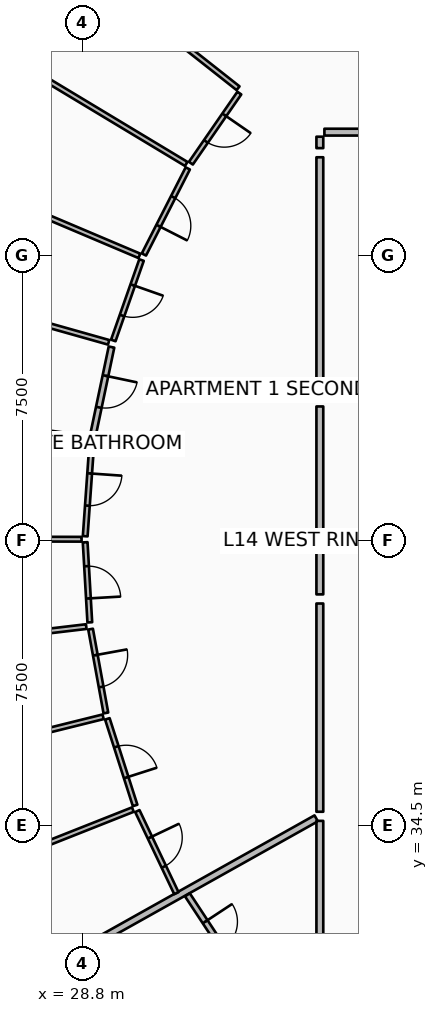
"""IFC4 building model, lengths in metres.
Left out: names, types, materials, properties, quantities, classifications, styles, units other than length and angle.
Written with IfcOpenShell. Run it as: python <this file> out.ifc"""

import sys

from ifc_helpers import new_model, si_unit, direction, frame, frame_2d, origin, place, context, subcontext, project, spatial, rectangle, extrude, element, fill, save


model = new_model("IFC4")
c1 = context("Model", 3, precision=1e-05, world=origin(), true_north=direction((0.0, 1.0)))
c2 = subcontext(c1, "Body", "Model", "MODEL_VIEW")
j1 = project(units=[si_unit("LENGTHUNIT", "METRE"), si_unit("PLANEANGLEUNIT", "RADIAN")], contexts=[c1])
p1 = place(None, origin())
s1 = spatial("IfcSite", under=j1, at=p1, CompositionType="ELEMENT")
p2 = place(p1, origin())
s2 = spatial("IfcBuilding", under=s1, at=p2, CompositionType="ELEMENT")
p3 = place(p2, frame((0.0, 0.0, 60.15)))
s3 = spatial("IfcBuildingStorey", under=s2, at=p3, CompositionType="ELEMENT", Elevation=60.15)
p4 = place(p3, frame((34.954, 34.694, 0.0), z_axis=(0.0, 0.0, 1.0), x_axis=(-0.872493465611, -0.488625779577, 0.0)))
e1 = element("IfcWall", 1, at=p4, inside=s3, PredefinedType="PARTITIONING", context=c2, shape_type="SweptSolid", body=[
    extrude(rectangle(XDim=16.586, YDim=0.18, at=frame_2d((8.293, 0.0))), origin(), (0.0, 0.0, 1.0), 2.867),
])
p5 = place(p3, frame((41.86, 52.75, 0.0), z_axis=(0.0, 0.0, 1.0), x_axis=(-1.0, 0.0, 0.0)))
e2 = element("IfcWall", 2, at=p5, inside=s3, PredefinedType="PARTITIONING", context=c2, shape_type="SweptSolid", body=[
    extrude(rectangle(XDim=6.69, YDim=0.18, at=frame_2d((3.345, 0.0))), origin(), (0.0, 0.0, 1.0), 2.867),
])
p6 = place(p5, frame((2.795, 0.0, 0.0)))
e3 = element("IfcOpeningElement", 3, at=p6, cuts=e2, PredefinedType="OPENING", context=c2, shape_type="SweptSolid", body=[
    extrude(rectangle(XDim=1.1, YDim=2.1, at=frame_2d((0.55, 1.05))), frame((0.0, 0.1, 0.0), z_axis=(0.0, -1.0, 0.0), x_axis=(1.0, 0.0, 0.0)), (0.0, 0.0, 1.0), 0.2),
])
p7 = place(p3, frame((35.05, 52.63, 0.0), z_axis=(0.0, 0.0, 1.0), x_axis=(0.0, -1.0, 0.0)))
e4 = element("IfcWall", 4, at=p7, inside=s3, PredefinedType="PARTITIONING", context=c2, shape_type="SweptSolid", body=[
    extrude(rectangle(XDim=0.301, YDim=0.18, at=frame_2d((0.15, 0.0))), origin(), (0.0, 0.0, 1.0), 2.867),
])
p8 = place(p3, frame((35.05, 52.089, 0.0), z_axis=(0.0, 0.0, 1.0), x_axis=(0.0, -1.0, 0.0)))
e5 = element("IfcWall", 5, at=p8, inside=s3, PredefinedType="PARTITIONING", context=c2, shape_type="SweptSolid", body=[
    extrude(rectangle(XDim=6.317, YDim=0.18, at=frame_2d((3.158, 0.0))), origin(), (0.0, 0.0, 1.0), 2.867),
])
p9 = place(p3, frame((32.898, 53.905, 0.0), z_axis=(0.0, 0.0, 1.0), x_axis=(-0.78532854108, 0.619079221558, 0.0)))
e6 = element("IfcWall", 6, at=p9, inside=s3, PredefinedType="PARTITIONING", context=c2, shape_type="SweptSolid", body=[
    extrude(rectangle(XDim=8.842, YDim=0.125, at=frame_2d((4.421, 0.0))), origin(), (0.0, 0.0, 1.0), 2.867),
])
p10 = place(p3, frame((31.534, 51.913, 0.0), z_axis=(0.0, 0.0, 1.0), x_axis=(-0.856706990958, 0.515803384676, 0.0)))
e7 = element("IfcWall", 7, at=p10, inside=s3, PredefinedType="PARTITIONING", context=c2, shape_type="SweptSolid", body=[
    extrude(rectangle(XDim=9.057, YDim=0.125, at=frame_2d((4.528, 0.0))), origin(), (0.0, 0.0, 1.0), 2.94),
])
p11 = place(p3, frame((30.301, 49.494, 0.0), z_axis=(0.0, 0.0, 1.0), x_axis=(-0.920840746031, 0.389938867579, 0.0)))
e8 = element("IfcWall", 8, at=p11, inside=s3, PredefinedType="PARTITIONING", context=c2, shape_type="SweptSolid", body=[
    extrude(rectangle(XDim=9.966, YDim=0.125, at=frame_2d((4.983, 0.0))), origin(), (0.0, 0.0, 1.0), 2.94),
])
p12 = place(p3, frame((32.931, 53.778, 0.0), z_axis=(0.0, 0.0, 1.0), x_axis=(-0.568541738061, -0.822654418382, 0.0)))
e9 = element("IfcWall", 9, at=p12, inside=s3, PredefinedType="PARTITIONING", context=c2, shape_type="SweptSolid", body=[
    extrude(rectangle(XDim=2.242, YDim=0.125, at=frame_2d((1.121, 0.0))), origin(), (0.0, 0.0, 1.0), 2.867),
])
p13 = place(p12, frame((0.696, 0.0, 0.0)))
e10 = element("IfcOpeningElement", 10, at=p13, cuts=e9, PredefinedType="OPENING", context=c2, shape_type="SweptSolid", body=[
    extrude(rectangle(XDim=0.85, YDim=2.06, at=frame_2d((0.425, 1.03))), frame((0.0, 0.073, 0.0), z_axis=(0.0, -1.0, 0.0), x_axis=(1.0, 0.0, 0.0)), (0.0, 0.0, 1.0), 0.145),
])
p14 = place(p3, frame((31.575, 51.796, 0.0), z_axis=(0.0, 0.0, 1.0), x_axis=(-0.454037986735, -0.890982326762, 0.0)))
e11 = element("IfcWall", 11, at=p14, inside=s3, PredefinedType="PARTITIONING", context=c2, shape_type="SweptSolid", body=[
    extrude(rectangle(XDim=2.542, YDim=0.125, at=frame_2d((1.271, 0.0))), origin(), (0.0, 0.0, 1.0), 2.94),
])
p15 = place(p14, frame((0.846, 0.0, 0.0)))
e12 = element("IfcOpeningElement", 12, at=p15, cuts=e11, PredefinedType="OPENING", context=c2, shape_type="SweptSolid", body=[
    extrude(rectangle(XDim=0.85, YDim=2.06, at=frame_2d((0.425, 1.03))), frame((0.0, 0.073, 0.0), z_axis=(0.0, -1.0, 0.0), x_axis=(1.0, 0.0, 0.0)), (0.0, 0.0, 1.0), 0.145),
])
p16 = place(p3, frame((30.358, 49.384, 0.0), z_axis=(0.0, 0.0, 1.0), x_axis=(-0.331344536708, -0.943509829304, 0.0)))
e13 = element("IfcWall", 13, at=p16, inside=s3, PredefinedType="PARTITIONING", context=c2, shape_type="SweptSolid", body=[
    extrude(rectangle(XDim=2.242, YDim=0.125, at=frame_2d((1.121, 0.0))), origin(), (0.0, 0.0, 1.0), 2.867),
])
p17 = place(p16, frame((0.696, 0.0, 0.0)))
e14 = element("IfcOpeningElement", 14, at=p17, cuts=e13, PredefinedType="OPENING", context=c2, shape_type="SweptSolid", body=[
    extrude(rectangle(XDim=0.85, YDim=2.06, at=frame_2d((0.425, 1.03))), frame((0.0, 0.073, 0.0), z_axis=(0.0, -1.0, 0.0), x_axis=(1.0, 0.0, 0.0)), (0.0, 0.0, 1.0), 0.145),
])
p18 = place(p3, frame((35.05, 45.532, 0.0), z_axis=(0.0, 0.0, 1.0), x_axis=(0.0, -1.0, 0.0)))
e15 = element("IfcWall", 15, at=p18, inside=s3, PredefinedType="PARTITIONING", context=c2, shape_type="SweptSolid", body=[
    extrude(rectangle(XDim=4.945, YDim=0.18, at=frame_2d((2.472, 0.0))), origin(), (0.0, 0.0, 1.0), 2.867),
])
p19 = place(p3, frame((29.492, 47.22, 0.0), z_axis=(0.0, 0.0, 1.0), x_axis=(-0.962454721813, 0.271442274635, 0.0)))
e16 = element("IfcWall", 16, at=p19, inside=s3, PredefinedType="PARTITIONING", context=c2, shape_type="SweptSolid", body=[
    extrude(rectangle(XDim=11.344, YDim=0.125, at=frame_2d((5.672, 0.0))), origin(), (0.0, 0.0, 1.0), 2.867),
])
p20 = place(p3, frame((29.568, 47.095, 0.0), z_axis=(0.0, 0.0, 1.0), x_axis=(-0.205861309483, -0.978581177654, 0.0)))
e17 = element("IfcWall", 17, at=p20, inside=s3, PredefinedType="PARTITIONING", context=c2, shape_type="SweptSolid", body=[
    extrude(rectangle(XDim=2.392, YDim=0.15, at=frame_2d((1.196, 0.0))), origin(), (0.0, 0.0, 1.0), 2.867),
])
p21 = place(p20, frame((0.771, 0.0, 0.0)))
e18 = element("IfcOpeningElement", 18, at=p21, cuts=e17, PredefinedType="OPENING", context=c2, shape_type="SweptSolid", body=[
    extrude(rectangle(XDim=0.85, YDim=2.06, at=frame_2d((0.425, 1.03))), frame((0.0, 0.085, 0.0), z_axis=(0.0, -1.0, 0.0), x_axis=(1.0, 0.0, 0.0)), (0.0, 0.0, 1.0), 0.17),
])
p22 = place(p3, frame((28.968, 44.678, 0.0), z_axis=(0.0, 0.0, 1.0), x_axis=(-0.990240767804, 0.139367219172, 0.0)))
e19 = element("IfcWall", 19, at=p22, inside=s3, PredefinedType="PARTITIONING", context=c2, shape_type="SweptSolid", body=[
    extrude(rectangle(XDim=4.46, YDim=0.15, at=frame_2d((2.23, 0.0))), origin(), (0.0, 0.0, 1.0), 2.94),
])
p23 = place(p3, frame((28.78, 42.038, 0.0), z_axis=(0.0, 0.0, 1.0), x_axis=(-0.999998036955, 0.001981435282, 0.0)))
e20 = element("IfcWall", 20, at=p23, inside=s3, PredefinedType="PARTITIONING", context=c2, shape_type="SweptSolid", body=[
    extrude(rectangle(XDim=12.075, YDim=0.125, at=frame_2d((6.038, 0.0))), origin(), (0.0, 0.0, 1.0), 2.94),
])
p24 = place(p3, frame((29.05, 44.576, 0.0), z_axis=(0.0, 0.0, 1.0), x_axis=(-0.070831673661, -0.997488282641, 0.0)))
e21 = element("IfcWall", 21, at=p24, inside=s3, PredefinedType="PARTITIONING", context=c2, shape_type="SweptSolid", body=[
    extrude(rectangle(XDim=2.464, YDim=0.125, at=frame_2d((1.232, 0.0))), origin(), (0.0, 0.0, 1.0), 2.94),
])
p25 = place(p24, frame((0.807, 0.0, 0.0)))
e22 = element("IfcOpeningElement", 22, at=p25, cuts=e21, PredefinedType="OPENING", context=c2, shape_type="SweptSolid", body=[
    extrude(rectangle(XDim=0.85, YDim=2.06, at=frame_2d((0.425, 1.03))), frame((0.0, 0.073, 0.0), z_axis=(0.0, -1.0, 0.0), x_axis=(1.0, 0.0, 0.0)), (0.0, 0.0, 1.0), 0.145),
])
p26 = place(p3, frame((28.875, 41.958, 0.0), z_axis=(0.0, 0.0, 1.0), x_axis=(0.057962417622, -0.998318765797, 0.0)))
e23 = element("IfcWall", 23, at=p26, inside=s3, PredefinedType="PARTITIONING", context=c2, shape_type="SweptSolid", body=[
    extrude(rectangle(XDim=2.11, YDim=0.125, at=frame_2d((1.055, 0.0))), origin(), (0.0, 0.0, 1.0), 2.867),
])
p27 = place(p26, frame((0.63, 0.0, 0.0)))
e24 = element("IfcOpeningElement", 24, at=p27, cuts=e23, PredefinedType="OPENING", context=c2, shape_type="SweptSolid", body=[
    extrude(rectangle(XDim=0.85, YDim=2.06, at=frame_2d((0.425, 1.03))), frame((0.0, 0.073, 0.0), z_axis=(0.0, -1.0, 0.0), x_axis=(1.0, 0.0, 0.0)), (0.0, 0.0, 1.0), 0.145),
])
p28 = place(p3, frame((35.05, 40.347, 0.0), z_axis=(0.0, 0.0, 1.0), x_axis=(0.0, -1.0, 0.0)))
e25 = element("IfcWall", 25, at=p28, inside=s3, PredefinedType="PARTITIONING", context=c2, shape_type="SweptSolid", body=[
    extrude(rectangle(XDim=5.48, YDim=0.18, at=frame_2d((2.74, 0.0))), origin(), (0.0, 0.0, 1.0), 2.867),
])
p29 = place(p3, frame((28.903, 39.74, 0.0), z_axis=(0.0, 0.0, 1.0), x_axis=(-0.993068040113, -0.117540919282, 0.0)))
e26 = element("IfcWall", 26, at=p29, inside=s3, PredefinedType="PARTITIONING", context=c2, shape_type="SweptSolid", body=[
    extrude(rectangle(XDim=12.309, YDim=0.125, at=frame_2d((6.154, 0.0))), origin(), (0.0, 0.0, 1.0), 2.867),
])
p30 = place(p3, frame((29.347, 37.366, 0.0), z_axis=(0.0, 0.0, 1.0), x_axis=(-0.970510462135, -0.241059002917, 0.0)))
e27 = element("IfcWall", 27, at=p30, inside=s3, PredefinedType="PARTITIONING", context=c2, shape_type="SweptSolid", body=[
    extrude(rectangle(XDim=11.79, YDim=0.125, at=frame_2d((5.895, 0.0))), origin(), (0.0, 0.0, 1.0), 2.94),
])
p31 = place(p3, frame((30.13, 34.925, 0.0), z_axis=(0.0, 0.0, 1.0), x_axis=(-0.929770978957, -0.368138461302, 0.0)))
e28 = element("IfcWall", 28, at=p31, inside=s3, PredefinedType="PARTITIONING", context=c2, shape_type="SweptSolid", body=[
    extrude(rectangle(XDim=11.773, YDim=0.125, at=frame_2d((5.887, 0.0))), origin(), (0.0, 0.0, 1.0), 2.94),
])
p32 = place(p3, frame((29.017, 39.673, 0.0), z_axis=(0.0, 0.0, 1.0), x_axis=(0.179632658462, -0.983733758704, 0.0)))
e29 = element("IfcWall", 29, at=p32, inside=s3, PredefinedType="PARTITIONING", context=c2, shape_type="SweptSolid", body=[
    extrude(rectangle(XDim=2.242, YDim=0.125, at=frame_2d((1.121, 0.0))), origin(), (0.0, 0.0, 1.0), 2.867),
])
p33 = place(p32, frame((0.696, 0.0, 0.0)))
e30 = element("IfcOpeningElement", 30, at=p33, cuts=e29, PredefinedType="OPENING", context=c2, shape_type="SweptSolid", body=[
    extrude(rectangle(XDim=0.85, YDim=2.06, at=frame_2d((0.425, 1.03))), frame((0.0, 0.073, 0.0), z_axis=(0.0, -1.0, 0.0), x_axis=(1.0, 0.0, 0.0)), (0.0, 0.0, 1.0), 0.145),
])
p34 = place(p3, frame((29.458, 37.312, 0.0), z_axis=(0.0, 0.0, 1.0), x_axis=(0.305338513131, -0.952243872335, 0.0)))
e31 = element("IfcWall", 31, at=p34, inside=s3, PredefinedType="PARTITIONING", context=c2, shape_type="SweptSolid", body=[
    extrude(rectangle(XDim=2.392, YDim=0.125, at=frame_2d((1.196, 0.0))), origin(), (0.0, 0.0, 1.0), 2.94),
])
p35 = place(p34, frame((0.771, 0.0, 0.0)))
e32 = element("IfcOpeningElement", 32, at=p35, cuts=e31, PredefinedType="OPENING", context=c2, shape_type="SweptSolid", body=[
    extrude(rectangle(XDim=0.85, YDim=2.06, at=frame_2d((0.425, 1.03))), frame((0.0, 0.073, 0.0), z_axis=(0.0, -1.0, 0.0), x_axis=(1.0, 0.0, 0.0)), (0.0, 0.0, 1.0), 0.145),
])
p36 = place(p3, frame((30.248, 34.885, 0.0), z_axis=(0.0, 0.0, 1.0), x_axis=(0.429366977128, -0.903130111862, 0.0)))
e33 = element("IfcWall", 33, at=p36, inside=s3, PredefinedType="PARTITIONING", context=c2, shape_type="SweptSolid", body=[
    extrude(rectangle(XDim=2.392, YDim=0.125, at=frame_2d((1.196, 0.0))), origin(), (0.0, 0.0, 1.0), 2.867),
])
p37 = place(p36, frame((0.771, 0.0, 0.0)))
e34 = element("IfcOpeningElement", 34, at=p37, cuts=e33, PredefinedType="OPENING", context=c2, shape_type="SweptSolid", body=[
    extrude(rectangle(XDim=0.85, YDim=2.06, at=frame_2d((0.425, 1.03))), frame((0.0, 0.073, 0.0), z_axis=(0.0, -1.0, 0.0), x_axis=(1.0, 0.0, 0.0)), (0.0, 0.0, 1.0), 0.145),
])
p38 = place(p3, frame((35.05, 34.628, 0.0), z_axis=(0.0, 0.0, 1.0), x_axis=(0.0, -1.0, 0.0)))
e35 = element("IfcWall", 35, at=p38, inside=s3, PredefinedType="PARTITIONING", context=c2, shape_type="SweptSolid", body=[
    extrude(rectangle(XDim=3.258, YDim=0.18, at=frame_2d((1.629, 0.0))), origin(), (0.0, 0.0, 1.0), 2.867),
])
p39 = place(p3, frame((31.565, 32.682, 0.0), z_axis=(0.0, 0.0, 1.0), x_axis=(0.550533618108, -0.834812994229, 0.0)))
e36 = element("IfcWall", 36, at=p39, inside=s3, PredefinedType="PARTITIONING", context=c2, shape_type="SweptSolid", body=[
    extrude(rectangle(XDim=2.546, YDim=0.15, at=frame_2d((1.273, 0.0))), origin(), (0.0, 0.0, 1.0), 2.867),
])
p40 = place(p39, frame((0.848, 0.0, 0.0)))
e37 = element("IfcOpeningElement", 37, at=p40, cuts=e36, PredefinedType="OPENING", context=c2, shape_type="SweptSolid", body=[
    extrude(rectangle(XDim=0.85, YDim=2.06, at=frame_2d((0.425, 1.03))), frame((0.0, 0.085, 0.0), z_axis=(0.0, -1.0, 0.0), x_axis=(1.0, 0.0, 0.0)), (0.0, 0.0, 1.0), 0.17),
])
p41 = place(p13, origin())
e38 = element("IfcDoor", 38, at=p41, inside=s3, OperationType="SINGLE_SWING_LEFT", PredefinedType="DOOR", context=c2, shape_type="SweptSolid", body=[
    extrude(rectangle(XDim=0.85, YDim=2.06, at=frame_2d((0.425, 1.03))), frame((0.0, 0.025, 0.0), z_axis=(0.0, -1.0, 0.0), x_axis=(1.0, 0.0, 0.0)), (0.0, 0.0, 1.0), 0.05),
])
fill(e10, e38)
p42 = place(p15, origin())
e39 = element("IfcDoor", 39, at=p42, inside=s3, OperationType="SINGLE_SWING_RIGHT", PredefinedType="DOOR", context=c2, shape_type="SweptSolid", body=[
    extrude(rectangle(XDim=0.85, YDim=2.06, at=frame_2d((0.425, 1.03))), frame((0.0, 0.025, 0.0), z_axis=(0.0, -1.0, 0.0), x_axis=(1.0, 0.0, 0.0)), (0.0, 0.0, 1.0), 0.05),
])
fill(e12, e39)
p43 = place(p17, origin())
e40 = element("IfcDoor", 40, at=p43, inside=s3, OperationType="SINGLE_SWING_LEFT", PredefinedType="DOOR", context=c2, shape_type="SweptSolid", body=[
    extrude(rectangle(XDim=0.85, YDim=2.06, at=frame_2d((0.425, 1.03))), frame((0.0, 0.025, 0.0), z_axis=(0.0, -1.0, 0.0), x_axis=(1.0, 0.0, 0.0)), (0.0, 0.0, 1.0), 0.05),
])
fill(e14, e40)
p44 = place(p21, origin())
e41 = element("IfcDoor", 41, at=p44, inside=s3, OperationType="SINGLE_SWING_LEFT", PredefinedType="DOOR", context=c2, shape_type="SweptSolid", body=[
    extrude(rectangle(XDim=0.85, YDim=2.06, at=frame_2d((0.425, 1.03))), frame((0.0, 0.025, 0.0), z_axis=(0.0, -1.0, 0.0), x_axis=(1.0, 0.0, 0.0)), (0.0, 0.0, 1.0), 0.05),
])
fill(e18, e41)
p45 = place(p25, origin())
e42 = element("IfcDoor", 42, at=p45, inside=s3, OperationType="SINGLE_SWING_LEFT", PredefinedType="DOOR", context=c2, shape_type="SweptSolid", body=[
    extrude(rectangle(XDim=0.85, YDim=2.06, at=frame_2d((0.425, 1.03))), frame((0.0, 0.025, 0.0), z_axis=(0.0, -1.0, 0.0), x_axis=(1.0, 0.0, 0.0)), (0.0, 0.0, 1.0), 0.05),
])
fill(e22, e42)
p46 = place(p27, origin())
e43 = element("IfcDoor", 43, at=p46, inside=s3, OperationType="SINGLE_SWING_RIGHT", PredefinedType="DOOR", context=c2, shape_type="SweptSolid", body=[
    extrude(rectangle(XDim=0.85, YDim=2.06, at=frame_2d((0.425, 1.03))), frame((0.0, 0.025, 0.0), z_axis=(0.0, -1.0, 0.0), x_axis=(1.0, 0.0, 0.0)), (0.0, 0.0, 1.0), 0.05),
])
fill(e24, e43)
p47 = place(p33, origin())
e44 = element("IfcDoor", 44, at=p47, inside=s3, OperationType="SINGLE_SWING_LEFT", PredefinedType="DOOR", context=c2, shape_type="SweptSolid", body=[
    extrude(rectangle(XDim=0.85, YDim=2.06, at=frame_2d((0.425, 1.03))), frame((0.0, 0.025, 0.0), z_axis=(0.0, -1.0, 0.0), x_axis=(1.0, 0.0, 0.0)), (0.0, 0.0, 1.0), 0.05),
])
fill(e30, e44)
p48 = place(p35, origin())
e45 = element("IfcDoor", 45, at=p48, inside=s3, OperationType="SINGLE_SWING_RIGHT", PredefinedType="DOOR", context=c2, shape_type="SweptSolid", body=[
    extrude(rectangle(XDim=0.85, YDim=2.06, at=frame_2d((0.425, 1.03))), frame((0.0, 0.025, 0.0), z_axis=(0.0, -1.0, 0.0), x_axis=(1.0, 0.0, 0.0)), (0.0, 0.0, 1.0), 0.05),
])
fill(e32, e45)
p49 = place(p37, origin())
e46 = element("IfcDoor", 46, at=p49, inside=s3, OperationType="SINGLE_SWING_LEFT", PredefinedType="DOOR", context=c2, shape_type="SweptSolid", body=[
    extrude(rectangle(XDim=0.85, YDim=2.06, at=frame_2d((0.425, 1.03))), frame((0.0, 0.025, 0.0), z_axis=(0.0, -1.0, 0.0), x_axis=(1.0, 0.0, 0.0)), (0.0, 0.0, 1.0), 0.05),
])
fill(e34, e46)
p50 = place(p40, origin())
e47 = element("IfcDoor", 47, at=p50, inside=s3, OperationType="SINGLE_SWING_LEFT", PredefinedType="DOOR", context=c2, shape_type="SweptSolid", body=[
    extrude(rectangle(XDim=0.85, YDim=2.06, at=frame_2d((0.425, 1.03))), frame((0.0, 0.025, 0.0), z_axis=(0.0, -1.0, 0.0), x_axis=(1.0, 0.0, 0.0)), (0.0, 0.0, 1.0), 0.05),
])
fill(e37, e47)
save(model, sys.argv[1])
